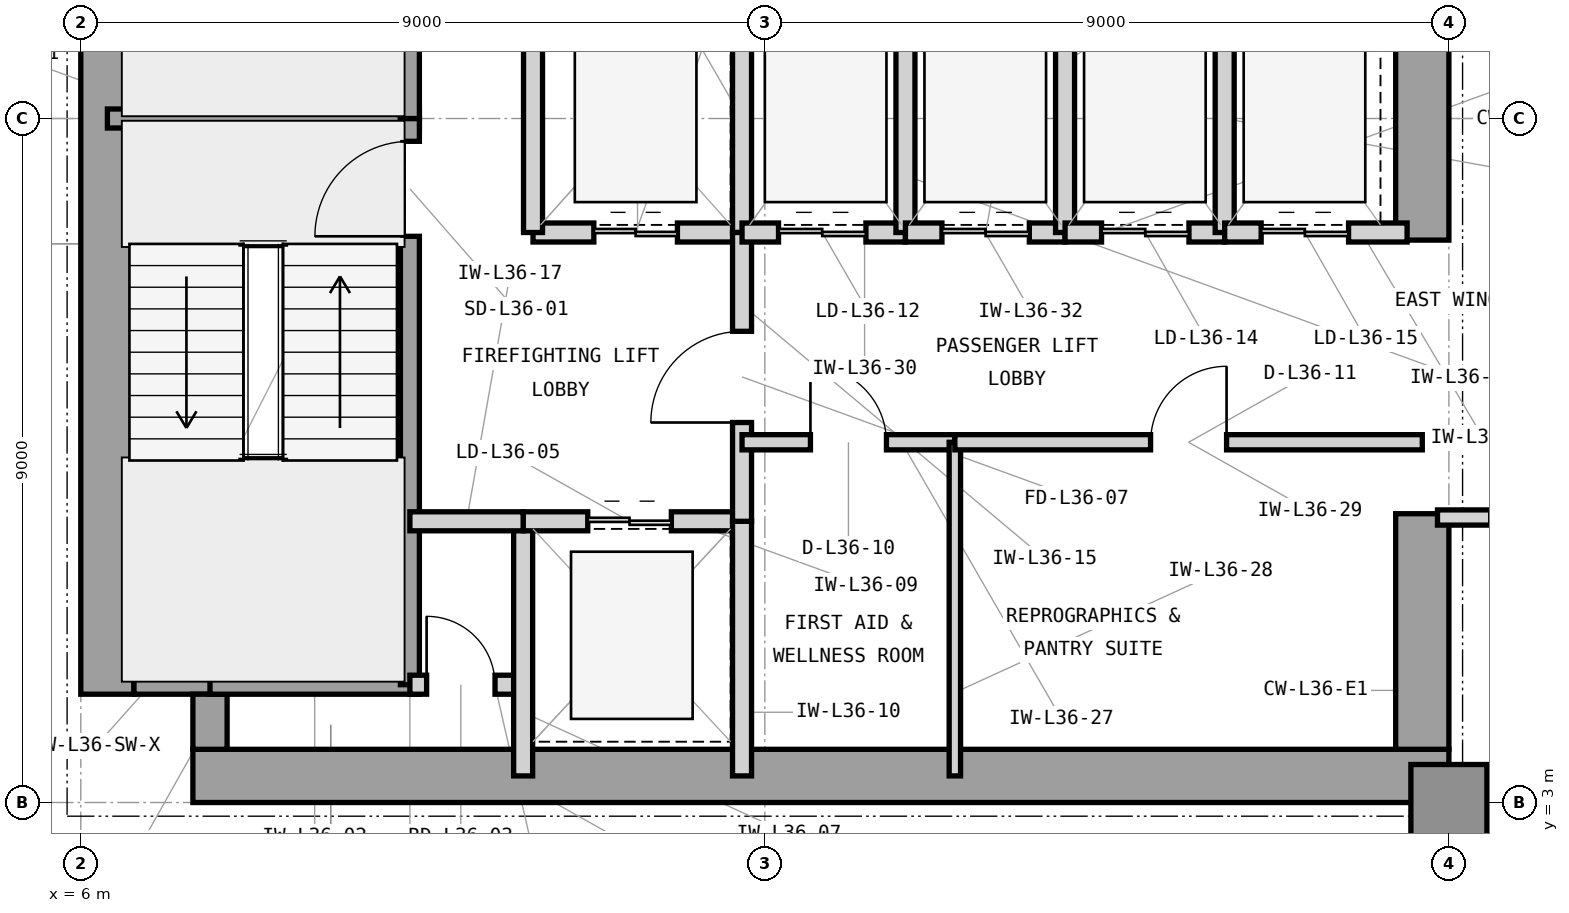
"""IFC4 building model, lengths in metres.
Left out: names, types, materials, properties, quantities, classifications, styles, units other than length and angle.
Written with IfcOpenShell. Run it as: python <this file> out.ifc"""

import sys

from ifc_helpers import new_model, si_unit, direction, frame, frame_2d, origin, origin_2d, place, context, subcontext, project, spatial, rectangle, extrude, element, fill, save


model = new_model("IFC4")
c1 = context("Model", 3, precision=1e-05, world=origin(), true_north=direction((0.0, 1.0)))
c2 = subcontext(c1, "Body", "Model", "MODEL_VIEW")
j1 = project(units=[si_unit("LENGTHUNIT", "METRE"), si_unit("PLANEANGLEUNIT", "RADIAN")], contexts=[c1])
p1 = place(None, origin())
s1 = spatial("IfcSite", under=j1, at=p1, CompositionType="ELEMENT")
p2 = place(p1, origin())
s2 = spatial("IfcBuilding", under=s1, at=p2, CompositionType="ELEMENT")
p3 = place(p2, frame((0.0, 0.0, 151.8)))
s3 = spatial("IfcBuildingStorey", under=s2, at=p3, CompositionType="ELEMENT", Elevation=151.8)
p4 = place(p3, frame((7.475, 3.35, 0.0), z_axis=(0.0, 0.0, 1.0), x_axis=(1.0, 0.0, 0.0)))
e1 = element("IfcWall", 1, at=p4, inside=s3, PredefinedType="SHEAR", context=c2, shape_type="SweptSolid", body=[
    extrude(rectangle(XDim=16.525, YDim=0.7, at=frame_2d((8.262, 0.0))), origin(), (0.0, 0.0, 1.0), 3.9),
])
p5 = place(p3, frame((6.35, 4.425, 0.0), z_axis=(0.0, 0.0, 1.0), x_axis=(0.0, 1.0, 0.0)))
e2 = element("IfcWall", 2, at=p5, inside=s3, PredefinedType="SHEAR", context=c2, shape_type="SweptSolid", body=[
    extrude(rectangle(XDim=15.15, YDim=0.7, at=frame_2d((7.575, 0.0))), origin(), (0.0, 0.0, 1.0), 3.9),
])
p6 = place(p3, frame((23.65, 3.7, 0.0), z_axis=(0.0, 0.0, 1.0), x_axis=(0.0, 1.0, 0.0)))
e3 = element("IfcWall", 3, at=p6, inside=s3, PredefinedType="SHEAR", context=c2, shape_type="SweptSolid", body=[
    extrude(rectangle(XDim=3.1, YDim=0.7, at=frame_2d((1.55, 0.0))), origin(), (0.0, 0.0, 1.0), 3.9),
])
p7 = place(p3, frame((23.65, 10.4, 0.0), z_axis=(0.0, 0.0, 1.0), x_axis=(0.0, 1.0, 0.0)))
e4 = element("IfcWall", 4, at=p7, inside=s3, PredefinedType="SHEAR", context=c2, shape_type="SweptSolid", body=[
    extrude(rectangle(XDim=3.2, YDim=0.7, at=frame_2d((1.6, 0.0))), origin(), (0.0, 0.0, 1.0), 3.9),
])
p8 = place(p3, frame((6.7, 4.65, 0.0), z_axis=(0.0, 0.0, 1.0), x_axis=(1.0, 0.0, 0.0)))
e5 = element("IfcWall", 5, at=p8, inside=s3, PredefinedType="SHEAR", context=c2, shape_type="SweptSolid", body=[
    extrude(rectangle(XDim=1.225, YDim=0.45, at=frame_2d((0.613, 0.0))), origin(), (0.0, 0.0, 1.0), 3.9),
])
p9 = place(p3, frame((7.7, 3.7, 0.0), z_axis=(0.0, 0.0, 1.0), x_axis=(0.0, 1.0, 0.0)))
e6 = element("IfcWall", 6, at=p9, inside=s3, PredefinedType="SHEAR", context=c2, shape_type="SweptSolid", body=[
    extrude(rectangle(XDim=0.725, YDim=0.45, at=frame_2d((0.363, 0.0))), origin(), (0.0, 0.0, 1.0), 3.9),
])
p10 = place(p3, frame((24.0, 3.0, 0.0), z_axis=(0.0, 0.0, 1.0), x_axis=(1.0, 0.0, 0.0)))
e7 = element("IfcColumn", 7, at=p10, inside=s3, PredefinedType="COLUMN", context=c2, shape_type="SweptSolid", body=[
    extrude(rectangle(XDim=1.0, YDim=1.0, at=origin_2d()), origin(), (0.0, 0.0, 1.0), 3.9),
])
p11 = place(p3, frame((23.9, 3.21, 0.0), z_axis=(0.0, 0.0, 1.0), x_axis=(1.0, 0.0, 0.0)))
e8 = element("IfcWall", 8, at=p11, inside=s3, PredefinedType="STANDARD", context=c2, shape_type="SweptSolid", body=[
    extrude(rectangle(XDim=34.5, YDim=0.42, at=frame_2d((17.25, 0.0))), origin(), (0.0, 0.0, 1.0), 3.62),
])
p12 = place(p11, frame((11.071, 0.0, 0.85)))
e9 = element("IfcOpeningElement", 9, at=p12, cuts=e8, PredefinedType="OPENING", context=c2, shape_type="SweptSolid", body=[
    extrude(rectangle(XDim=2.5, YDim=2.25, at=frame_2d((1.25, 1.125))), frame((0.0, 0.22, 0.0), z_axis=(0.0, -1.0, 0.0), x_axis=(1.0, 0.0, 0.0)), (0.0, 0.0, 1.0), 0.44),
])
p13 = place(p11, frame((1.1, 0.0, 0.85)))
e10 = element("IfcOpeningElement", 10, at=p13, cuts=e8, PredefinedType="OPENING", context=c2, shape_type="SweptSolid", body=[
    extrude(rectangle(XDim=1.2, YDim=2.25, at=frame_2d((0.6, 1.125))), frame((0.0, 0.22, 0.0), z_axis=(0.0, -1.0, 0.0), x_axis=(1.0, 0.0, 0.0)), (0.0, 0.0, 1.0), 0.44),
])
p14 = place(p3, frame((6.35, 12.0, 0.0), z_axis=(0.0, 0.0, 1.0), x_axis=(1.0, 0.0, 0.0)))
e11 = element("IfcWall", 11, at=p14, inside=s3, PredefinedType="SHEAR", context=c2, shape_type="SweptSolid", body=[
    extrude(rectangle(XDim=4.105, YDim=0.25, at=frame_2d((2.052, 0.0))), origin(), (0.0, 0.0, 1.0), 3.9),
])
p15 = place(p3, frame((7.7, 4.55, 0.0), z_axis=(0.0, 0.0, 1.0), x_axis=(1.0, 0.0, 0.0)))
e12 = element("IfcWall", 12, at=p15, inside=s3, PredefinedType="SHEAR", context=c2, shape_type="SweptSolid", body=[
    extrude(rectangle(XDim=2.755, YDim=0.25, at=frame_2d((1.377, 0.0))), origin(), (0.0, 0.0, 1.0), 3.9),
])
p16 = place(p3, frame((10.33, 4.55, 0.0), z_axis=(0.0, 0.0, 1.0), x_axis=(0.0, 1.0, 0.0)))
e13 = element("IfcWall", 13, at=p16, inside=s3, PredefinedType="SHEAR", context=c2, shape_type="SweptSolid", body=[
    extrude(rectangle(XDim=7.45, YDim=0.25, at=frame_2d((3.725, 0.0))), origin(), (0.0, 0.0, 1.0), 3.9),
])
p17 = place(p16, frame((5.9, 0.0, 0.0)))
e14 = element("IfcOpeningElement", 14, at=p17, cuts=e13, PredefinedType="OPENING", context=c2, shape_type="SweptSolid", body=[
    extrude(rectangle(XDim=1.25, YDim=2.2, at=frame_2d((0.625, 1.1))), frame((0.0, 0.135, 0.0), z_axis=(0.0, -1.0, 0.0), x_axis=(1.0, 0.0, 0.0)), (0.0, 0.0, 1.0), 0.27),
])
p18 = place(p3, frame((10.33, 12.0, 0.0), z_axis=(0.0, 0.0, 1.0), x_axis=(0.0, 1.0, 0.0)))
e15 = element("IfcWall", 15, at=p18, inside=s3, PredefinedType="SHEAR", context=c2, shape_type="SweptSolid", body=[
    extrude(rectangle(XDim=7.45, YDim=0.25, at=frame_2d((3.725, 0.0))), origin(), (0.0, 0.0, 1.0), 3.9),
])
p19 = place(p18, frame((5.85, 0.0, 0.0)))
e16 = element("IfcOpeningElement", 16, at=p19, cuts=e15, PredefinedType="OPENING", context=c2, shape_type="SweptSolid", body=[
    extrude(rectangle(XDim=1.25, YDim=2.2, at=frame_2d((0.625, 1.1))), frame((0.0, 0.135, 0.0), z_axis=(0.0, -1.0, 0.0), x_axis=(1.0, 0.0, 0.0)), (0.0, 0.0, 1.0), 0.27),
])
p20 = place(p3, frame((10.33, 4.55, 0.0), z_axis=(0.0, 0.0, 1.0), x_axis=(1.0, 0.0, 0.0)))
e17 = element("IfcWall", 17, at=p20, inside=s3, PredefinedType="PARTITIONING", context=c2, shape_type="SweptSolid", body=[
    extrude(rectangle(XDim=1.49, YDim=0.25, at=frame_2d((0.745, 0.0))), origin(), (0.0, 0.0, 1.0), 3.61),
])
p21 = place(p20, frame((0.22, 0.0, 0.0)))
e18 = element("IfcOpeningElement", 18, at=p21, cuts=e17, PredefinedType="OPENING", context=c2, shape_type="SweptSolid", body=[
    extrude(rectangle(XDim=0.9, YDim=2.1, at=frame_2d((0.45, 1.05))), frame((0.0, 0.135, 0.0), z_axis=(0.0, -1.0, 0.0), x_axis=(1.0, 0.0, 0.0)), (0.0, 0.0, 1.0), 0.27),
])
p22 = place(p3, frame((11.82, 3.35, 0.0), z_axis=(0.0, 0.0, 1.0), x_axis=(0.0, 1.0, 0.0)))
e19 = element("IfcWall", 19, at=p22, inside=s3, PredefinedType="PARTITIONING", context=c2, shape_type="SweptSolid", body=[
    extrude(rectangle(XDim=3.35, YDim=0.25, at=frame_2d((1.675, 0.0))), origin(), (0.0, 0.0, 1.0), 3.61),
])
p23 = place(p3, frame((11.82, 6.7, 0.0), z_axis=(0.0, 0.0, 1.0), x_axis=(1.0, 0.0, 0.0)))
e20 = element("IfcWall", 20, at=p23, inside=s3, PredefinedType="PARTITIONING", context=c2, shape_type="SweptSolid", body=[
    extrude(rectangle(XDim=2.88, YDim=0.25, at=frame_2d((1.44, 0.0))), origin(), (0.0, 0.0, 1.0), 3.066),
])
p24 = place(p23, frame((0.85, 0.0, 0.0)))
e21 = element("IfcOpeningElement", 21, at=p24, cuts=e20, PredefinedType="OPENING", context=c2, shape_type="SweptSolid", body=[
    extrude(rectangle(XDim=1.1, YDim=2.25, at=frame_2d((0.55, 1.125))), frame((0.0, 0.135, 0.0), z_axis=(0.0, -1.0, 0.0), x_axis=(1.0, 0.0, 0.0)), (0.0, 0.0, 1.0), 0.27),
])
p25 = place(p3, frame((14.7, 3.35, 0.0), z_axis=(0.0, 0.0, 1.0), x_axis=(0.0, 1.0, 0.0)))
e22 = element("IfcWall", 22, at=p25, inside=s3, PredefinedType="PARTITIONING", context=c2, shape_type="SweptSolid", body=[
    extrude(rectangle(XDim=3.35, YDim=0.25, at=frame_2d((1.675, 0.0))), origin(), (0.0, 0.0, 1.0), 3.61),
])
p26 = place(p3, frame((11.95, 10.5, 0.0), z_axis=(0.0, 0.0, 1.0), x_axis=(1.0, 0.0, 0.0)))
e23 = element("IfcWall", 23, at=p26, inside=s3, PredefinedType="PARTITIONING", context=c2, shape_type="SweptSolid", body=[
    extrude(rectangle(XDim=2.75, YDim=0.25, at=frame_2d((1.375, 0.0))), origin(), (0.0, 0.0, 1.0), 3.066),
])
p27 = place(p26, frame((0.8, 0.0, 0.0)))
e24 = element("IfcOpeningElement", 24, at=p27, cuts=e23, PredefinedType="OPENING", context=c2, shape_type="SweptSolid", body=[
    extrude(rectangle(XDim=1.1, YDim=2.25, at=frame_2d((0.55, 1.125))), frame((0.0, 0.135, 0.0), z_axis=(0.0, -1.0, 0.0), x_axis=(1.0, 0.0, 0.0)), (0.0, 0.0, 1.0), 0.27),
])
for number, where, z_axis, x_axis in (
    (25, (11.95, 10.5, 0.0), (0.0, 0.0, 1.0), (0.0, 1.0, 0.0)),
    (26, (14.7, 10.5, 0.0), (0.0, 0.0, 1.0), (0.0, 1.0, 0.0)),
):
    element("IfcWall", number, at=place(p3, frame(where, z_axis=z_axis, x_axis=x_axis)), inside=s3, PredefinedType="PARTITIONING", context=c2, shape_type="SweptSolid", body=[
        extrude(rectangle(XDim=3.0, YDim=0.25, at=frame_2d((1.5, 0.0))), origin(), (0.0, 0.0, 1.0), 3.61),
    ])
p28 = place(p3, frame((14.7, 6.7, 0.0), z_axis=(0.0, 0.0, 1.0), x_axis=(0.0, 1.0, 0.0)))
e27 = element("IfcWall", 27, at=p28, inside=s3, PredefinedType="PARTITIONING", context=c2, shape_type="SweptSolid", body=[
    extrude(rectangle(XDim=3.8, YDim=0.25, at=frame_2d((1.9, 0.0))), origin(), (0.0, 0.0, 1.0), 3.61),
])
p29 = place(p28, frame((1.3, 0.0, 0.0)))
e28 = element("IfcOpeningElement", 28, at=p29, cuts=e27, PredefinedType="OPENING", context=c2, shape_type="SweptSolid", body=[
    extrude(rectangle(XDim=1.2, YDim=2.2, at=frame_2d((0.6, 1.1))), frame((0.0, 0.135, 0.0), z_axis=(0.0, -1.0, 0.0), x_axis=(1.0, 0.0, 0.0)), (0.0, 0.0, 1.0), 0.27),
])
p30 = place(p3, frame((10.33, 6.7, 0.0), z_axis=(0.0, 0.0, 1.0), x_axis=(1.0, 0.0, 0.0)))
e29 = element("IfcWall", 29, at=p30, inside=s3, PredefinedType="PARTITIONING", context=c2, shape_type="SweptSolid", body=[
    extrude(rectangle(XDim=1.49, YDim=0.25, at=frame_2d((0.745, 0.0))), origin(), (0.0, 0.0, 1.0), 3.066),
])
p31 = place(p3, frame((14.7, 7.74, 0.0), z_axis=(0.0, 0.0, 1.0), x_axis=(1.0, 0.0, 0.0)))
e30 = element("IfcWall", 30, at=p31, inside=s3, PredefinedType="PARTITIONING", context=c2, shape_type="SweptSolid", body=[
    extrude(rectangle(XDim=2.8, YDim=0.2, at=frame_2d((1.4, 0.0))), origin(), (0.0, 0.0, 1.0), 3.61),
])
p32 = place(p31, frame((0.9, 0.0, 0.0)))
e31 = element("IfcOpeningElement", 31, at=p32, cuts=e30, PredefinedType="OPENING", context=c2, shape_type="SweptSolid", body=[
    extrude(rectangle(XDim=1.0, YDim=2.15, at=frame_2d((0.5, 1.075))), frame((0.0, 0.11, 0.0), z_axis=(0.0, -1.0, 0.0), x_axis=(1.0, 0.0, 0.0)), (0.0, 0.0, 1.0), 0.22),
])
p33 = place(p3, frame((17.5, 3.35, 0.0), z_axis=(0.0, 0.0, 1.0), x_axis=(0.0, 1.0, 0.0)))
e32 = element("IfcWall", 32, at=p33, inside=s3, PredefinedType="PARTITIONING", context=c2, shape_type="SweptSolid", body=[
    extrude(rectangle(XDim=4.39, YDim=0.15, at=frame_2d((2.195, 0.0))), origin(), (0.0, 0.0, 1.0), 3.61),
])
p34 = place(p3, frame((17.5, 7.74, 0.0), z_axis=(0.0, 0.0, 1.0), x_axis=(1.0, 0.0, 0.0)))
e33 = element("IfcWall", 33, at=p34, inside=s3, PredefinedType="PARTITIONING", context=c2, shape_type="SweptSolid", body=[
    extrude(rectangle(XDim=6.15, YDim=0.2, at=frame_2d((3.075, 0.0))), origin(), (0.0, 0.0, 1.0), 3.61),
])
p35 = place(p34, frame((2.575, 0.0, 0.0)))
e34 = element("IfcOpeningElement", 34, at=p35, cuts=e33, PredefinedType="OPENING", context=c2, shape_type="SweptSolid", body=[
    extrude(rectangle(XDim=1.0, YDim=2.15, at=frame_2d((0.5, 1.075))), frame((0.0, 0.11, 0.0), z_axis=(0.0, -1.0, 0.0), x_axis=(1.0, 0.0, 0.0)), (0.0, 0.0, 1.0), 0.22),
])
p36 = place(p3, frame((14.7, 10.5, 0.0), z_axis=(0.0, 0.0, 1.0), x_axis=(1.0, 0.0, 0.0)))
e35 = element("IfcWall", 35, at=p36, inside=s3, PredefinedType="PARTITIONING", context=c2, shape_type="SweptSolid", body=[
    extrude(rectangle(XDim=2.15, YDim=0.25, at=frame_2d((1.075, 0.0))), origin(), (0.0, 0.0, 1.0), 3.066),
])
p37 = place(p36, frame((0.48, 0.0, 0.0)))
e36 = element("IfcOpeningElement", 36, at=p37, cuts=e35, PredefinedType="OPENING", context=c2, shape_type="SweptSolid", body=[
    extrude(rectangle(XDim=1.15, YDim=2.25, at=frame_2d((0.575, 1.125))), frame((0.0, 0.135, 0.0), z_axis=(0.0, -1.0, 0.0), x_axis=(1.0, 0.0, 0.0)), (0.0, 0.0, 1.0), 0.27),
])
p38 = place(p3, frame((16.85, 10.5, 0.0), z_axis=(0.0, 0.0, 1.0), x_axis=(0.0, 1.0, 0.0)))
e37 = element("IfcWall", 37, at=p38, inside=s3, PredefinedType="PARTITIONING", context=c2, shape_type="SweptSolid", body=[
    extrude(rectangle(XDim=3.0, YDim=0.25, at=frame_2d((1.5, 0.0))), origin(), (0.0, 0.0, 1.0), 3.61),
])
p39 = place(p3, frame((16.85, 10.5, 0.0), z_axis=(0.0, 0.0, 1.0), x_axis=(1.0, 0.0, 0.0)))
e38 = element("IfcWall", 38, at=p39, inside=s3, PredefinedType="PARTITIONING", context=c2, shape_type="SweptSolid", body=[
    extrude(rectangle(XDim=2.1, YDim=0.25, at=frame_2d((1.05, 0.0))), origin(), (0.0, 0.0, 1.0), 3.066),
])
p40 = place(p39, frame((0.48, 0.0, 0.0)))
e39 = element("IfcOpeningElement", 39, at=p40, cuts=e38, PredefinedType="OPENING", context=c2, shape_type="SweptSolid", body=[
    extrude(rectangle(XDim=1.15, YDim=2.25, at=frame_2d((0.575, 1.125))), frame((0.0, 0.135, 0.0), z_axis=(0.0, -1.0, 0.0), x_axis=(1.0, 0.0, 0.0)), (0.0, 0.0, 1.0), 0.27),
])
p41 = place(p3, frame((18.95, 10.5, 0.0), z_axis=(0.0, 0.0, 1.0), x_axis=(0.0, 1.0, 0.0)))
e40 = element("IfcWall", 40, at=p41, inside=s3, PredefinedType="PARTITIONING", context=c2, shape_type="SweptSolid", body=[
    extrude(rectangle(XDim=3.0, YDim=0.25, at=frame_2d((1.5, 0.0))), origin(), (0.0, 0.0, 1.0), 3.61),
])
p42 = place(p3, frame((18.95, 10.5, 0.0), z_axis=(0.0, 0.0, 1.0), x_axis=(1.0, 0.0, 0.0)))
e41 = element("IfcWall", 41, at=p42, inside=s3, PredefinedType="PARTITIONING", context=c2, shape_type="SweptSolid", body=[
    extrude(rectangle(XDim=2.1, YDim=0.25, at=frame_2d((1.05, 0.0))), origin(), (0.0, 0.0, 1.0), 3.066),
])
p43 = place(p42, frame((0.48, 0.0, 0.0)))
e42 = element("IfcOpeningElement", 42, at=p43, cuts=e41, PredefinedType="OPENING", context=c2, shape_type="SweptSolid", body=[
    extrude(rectangle(XDim=1.15, YDim=2.25, at=frame_2d((0.575, 1.125))), frame((0.0, 0.135, 0.0), z_axis=(0.0, -1.0, 0.0), x_axis=(1.0, 0.0, 0.0)), (0.0, 0.0, 1.0), 0.27),
])
p44 = place(p3, frame((21.05, 10.5, 0.0), z_axis=(0.0, 0.0, 1.0), x_axis=(0.0, 1.0, 0.0)))
e43 = element("IfcWall", 43, at=p44, inside=s3, PredefinedType="PARTITIONING", context=c2, shape_type="SweptSolid", body=[
    extrude(rectangle(XDim=3.0, YDim=0.25, at=frame_2d((1.5, 0.0))), origin(), (0.0, 0.0, 1.0), 3.61),
])
p45 = place(p3, frame((21.05, 10.5, 0.0), z_axis=(0.0, 0.0, 1.0), x_axis=(1.0, 0.0, 0.0)))
e44 = element("IfcWall", 44, at=p45, inside=s3, PredefinedType="PARTITIONING", context=c2, shape_type="SweptSolid", body=[
    extrude(rectangle(XDim=2.4, YDim=0.25, at=frame_2d((1.2, 0.0))), origin(), (0.0, 0.0, 1.0), 3.066),
])
p46 = place(p45, frame((0.48, 0.0, 0.0)))
e45 = element("IfcOpeningElement", 45, at=p46, cuts=e44, PredefinedType="OPENING", context=c2, shape_type="SweptSolid", body=[
    extrude(rectangle(XDim=1.15, YDim=2.25, at=frame_2d((0.575, 1.125))), frame((0.0, 0.135, 0.0), z_axis=(0.0, -1.0, 0.0), x_axis=(1.0, 0.0, 0.0)), (0.0, 0.0, 1.0), 0.27),
])
p47 = place(p3, frame((23.85, 6.75, 0.0), z_axis=(0.0, 0.0, 1.0), x_axis=(1.0, 0.0, 0.0)))
e46 = element("IfcWall", 46, at=p47, inside=s3, PredefinedType="PARTITIONING", context=c2, shape_type="SweptSolid", body=[
    extrude(rectangle(XDim=2.85, YDim=0.2, at=frame_2d((1.425, 0.0))), origin(), (0.0, 0.0, 1.0), 3.61),
])
p48 = place(p47, frame((0.7, 0.0, 0.0)))
e47 = element("IfcOpeningElement", 47, at=p48, cuts=e46, PredefinedType="OPENING", context=c2, shape_type="SweptSolid", body=[
    extrude(rectangle(XDim=1.0, YDim=2.15, at=frame_2d((0.5, 1.075))), frame((0.0, 0.11, 0.0), z_axis=(0.0, -1.0, 0.0), x_axis=(1.0, 0.0, 0.0)), (0.0, 0.0, 1.0), 0.22),
])
p49 = place(p17, origin())
e48 = element("IfcDoor", 48, at=p49, inside=s3, OperationType="SINGLE_SWING_LEFT", PredefinedType="DOOR", context=c2, shape_type="SweptSolid", body=[
    extrude(rectangle(XDim=1.25, YDim=2.2, at=frame_2d((0.625, 1.1))), frame((0.0, 0.025, 0.0), z_axis=(0.0, -1.0, 0.0), x_axis=(1.0, 0.0, 0.0)), (0.0, 0.0, 1.0), 0.05),
])
fill(e14, e48)
p50 = place(p21, origin())
e49 = element("IfcDoor", 49, at=p50, inside=s3, OperationType="SINGLE_SWING_LEFT", PredefinedType="TRAPDOOR", context=c2, shape_type="SweptSolid", body=[
    extrude(rectangle(XDim=0.9, YDim=2.1, at=frame_2d((0.45, 1.05))), frame((0.0, 0.025, 0.0), z_axis=(0.0, -1.0, 0.0), x_axis=(1.0, 0.0, 0.0)), (0.0, 0.0, 1.0), 0.05),
])
fill(e18, e49)
p51 = place(p24, origin())
e50 = element("IfcDoor", 50, at=p51, inside=s3, OperationType="DOUBLE_DOOR_SLIDING", PredefinedType="DOOR", context=c2, shape_type="SweptSolid", body=[
    extrude(rectangle(XDim=1.1, YDim=2.25, at=frame_2d((0.55, 1.125))), frame((0.0, 0.025, 0.0), z_axis=(0.0, -1.0, 0.0), x_axis=(1.0, 0.0, 0.0)), (0.0, 0.0, 1.0), 0.05),
])
fill(e21, e50)
p52 = place(p27, origin())
e51 = element("IfcDoor", 51, at=p52, inside=s3, OperationType="DOUBLE_DOOR_SLIDING", PredefinedType="DOOR", context=c2, shape_type="SweptSolid", body=[
    extrude(rectangle(XDim=1.1, YDim=2.25, at=frame_2d((0.55, 1.125))), frame((0.0, 0.025, 0.0), z_axis=(0.0, -1.0, 0.0), x_axis=(1.0, 0.0, 0.0)), (0.0, 0.0, 1.0), 0.05),
])
fill(e24, e51)
p53 = place(p29, origin())
e52 = element("IfcDoor", 52, at=p53, inside=s3, OperationType="SINGLE_SWING_LEFT", PredefinedType="DOOR", context=c2, shape_type="SweptSolid", body=[
    extrude(rectangle(XDim=1.2, YDim=2.2, at=frame_2d((0.6, 1.1))), frame((0.0, 0.025, 0.0), z_axis=(0.0, -1.0, 0.0), x_axis=(1.0, 0.0, 0.0)), (0.0, 0.0, 1.0), 0.05),
])
fill(e28, e52)
p54 = place(p32, origin())
e53 = element("IfcDoor", 53, at=p54, inside=s3, OperationType="SINGLE_SWING_LEFT", PredefinedType="DOOR", context=c2, shape_type="SweptSolid", body=[
    extrude(rectangle(XDim=1.0, YDim=2.15, at=frame_2d((0.5, 1.075))), frame((0.0, 0.025, 0.0), z_axis=(0.0, -1.0, 0.0), x_axis=(1.0, 0.0, 0.0)), (0.0, 0.0, 1.0), 0.05),
])
fill(e31, e53)
p55 = place(p35, origin())
e54 = element("IfcDoor", 54, at=p55, inside=s3, OperationType="SINGLE_SWING_RIGHT", PredefinedType="DOOR", context=c2, shape_type="SweptSolid", body=[
    extrude(rectangle(XDim=1.0, YDim=2.15, at=frame_2d((0.5, 1.075))), frame((0.0, 0.025, 0.0), z_axis=(0.0, -1.0, 0.0), x_axis=(1.0, 0.0, 0.0)), (0.0, 0.0, 1.0), 0.05),
])
fill(e34, e54)
p56 = place(p37, origin())
e55 = element("IfcDoor", 55, at=p56, inside=s3, OperationType="DOUBLE_DOOR_SLIDING", PredefinedType="DOOR", context=c2, shape_type="SweptSolid", body=[
    extrude(rectangle(XDim=1.15, YDim=2.25, at=frame_2d((0.575, 1.125))), frame((0.0, 0.025, 0.0), z_axis=(0.0, -1.0, 0.0), x_axis=(1.0, 0.0, 0.0)), (0.0, 0.0, 1.0), 0.05),
])
fill(e36, e55)
p57 = place(p40, origin())
e56 = element("IfcDoor", 56, at=p57, inside=s3, OperationType="DOUBLE_DOOR_SLIDING", PredefinedType="DOOR", context=c2, shape_type="SweptSolid", body=[
    extrude(rectangle(XDim=1.15, YDim=2.25, at=frame_2d((0.575, 1.125))), frame((0.0, 0.025, 0.0), z_axis=(0.0, -1.0, 0.0), x_axis=(1.0, 0.0, 0.0)), (0.0, 0.0, 1.0), 0.05),
])
fill(e39, e56)
p58 = place(p43, origin())
e57 = element("IfcDoor", 57, at=p58, inside=s3, OperationType="DOUBLE_DOOR_SLIDING", PredefinedType="DOOR", context=c2, shape_type="SweptSolid", body=[
    extrude(rectangle(XDim=1.15, YDim=2.25, at=frame_2d((0.575, 1.125))), frame((0.0, 0.025, 0.0), z_axis=(0.0, -1.0, 0.0), x_axis=(1.0, 0.0, 0.0)), (0.0, 0.0, 1.0), 0.05),
])
fill(e42, e57)
p59 = place(p46, origin())
e58 = element("IfcDoor", 58, at=p59, inside=s3, OperationType="DOUBLE_DOOR_SLIDING", PredefinedType="DOOR", context=c2, shape_type="SweptSolid", body=[
    extrude(rectangle(XDim=1.15, YDim=2.25, at=frame_2d((0.575, 1.125))), frame((0.0, 0.025, 0.0), z_axis=(0.0, -1.0, 0.0), x_axis=(1.0, 0.0, 0.0)), (0.0, 0.0, 1.0), 0.05),
])
fill(e45, e58)
save(model, sys.argv[1])
